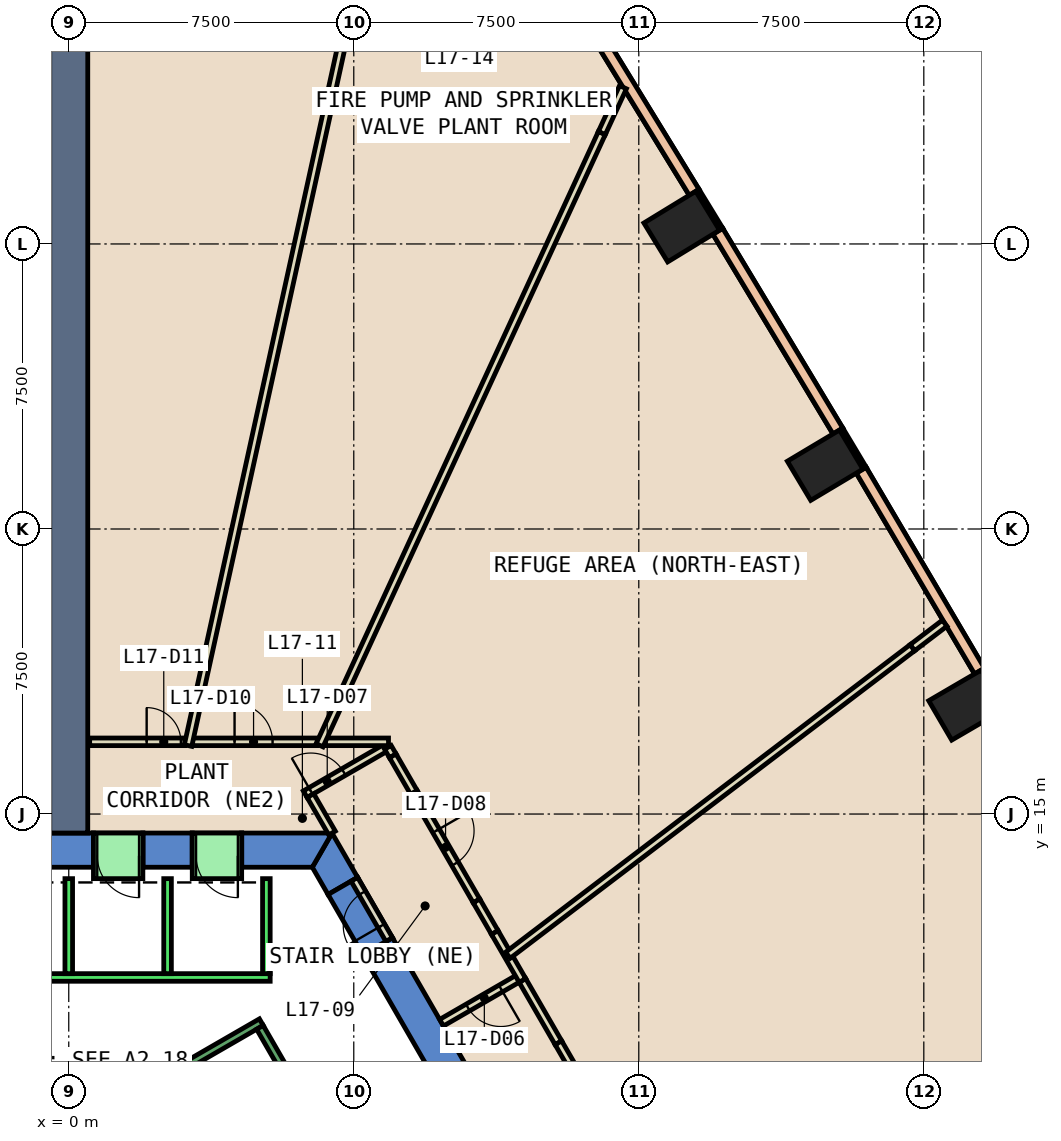
"""IFC4 building model, lengths in metres.
Left out: names, types, materials, properties, quantities, classifications, styles, units other than length and angle.
Written with IfcOpenShell. Run it as: python <this file> out.ifc"""

import sys

from ifc_helpers import new_model, si_unit, direction, frame, frame_2d, origin, origin_2d, place, context, subcontext, project, spatial, polyline, rectangle, outline, extrude, element, fill, save


model = new_model("IFC4")
c1 = context("Model", 3, precision=1e-05, world=origin(), true_north=direction((0.0, 1.0)))
c2 = subcontext(c1, "Body", "Model", "MODEL_VIEW")
j1 = project(units=[si_unit("LENGTHUNIT", "METRE"), si_unit("PLANEANGLEUNIT", "RADIAN")], contexts=[c1])
p1 = place(None, origin())
s1 = spatial("IfcSite", under=j1, at=p1, CompositionType="ELEMENT")
p2 = place(p1, origin())
s2 = spatial("IfcBuilding", under=s1, at=p2, CompositionType="ELEMENT")
p3 = place(p2, frame((0.0, 0.0, 81.2)))
s3 = spatial("IfcBuildingStorey", under=s2, at=p3, CompositionType="ELEMENT", Elevation=81.2)
for number, where, z_axis, x_axis in (
    (1, (23.623, 17.867, -0.6), (0.0, 0.0, 1.0), (-0.504, 0.864, 0.0)),
    (2, (19.904, 24.179, -0.6), (0.0, 0.0, 1.0), (-0.513, 0.858, 0.0)),
    (3, (16.13, 30.457, -0.6), (0.0, 0.0, 1.0), (-0.522, 0.853, 0.0)),
):
    element("IfcColumn", number, at=place(p3, frame(where, z_axis=z_axis, x_axis=x_axis)), inside=s3, PredefinedType="COLUMN", context=c2, shape_type="SweptSolid", body=[
        extrude(rectangle(XDim=1.2, YDim=1.6, at=origin_2d()), origin(), (0.0, 0.0, 1.0), 5.4),
    ])
p4 = place(p3, frame((0.0, 0.0, -0.6)))
e4 = element("IfcWall", 4, at=p4, inside=s3, PredefinedType="SHEAR", context=c2, shape_type="SweptSolid", body=[
    extrude(outline(polyline([(8.517, 11.747), (7.738, 11.298), (12.817, 2.5), (13.856, 2.5), (8.517, 11.747)])), origin(), (0.0, 0.0, 1.0), 5.4),
])
p5 = place(p3, frame((0.0, 0.0, -0.6)))
e5 = element("IfcWall", 5, at=p5, inside=s3, PredefinedType="SHEAR", context=c2, shape_type="SweptSolid", body=[
    extrude(outline(polyline([(6.823, 12.882), (7.602, 13.332), (6.928, 14.5), (6.409, 13.6), (6.823, 12.882)])), origin(), (0.0, 0.0, 1.0), 5.4),
])
p6 = place(p3, frame((0.0, 0.0, 3.6)))
e6 = element("IfcWall", 6, at=p6, inside=s3, PredefinedType="SHEAR", context=c2, shape_type="SweptSolid", body=[
    extrude(outline(polyline([(7.602, 13.332), (6.823, 12.882), (7.738, 11.298), (8.517, 11.747), (7.602, 13.332)])), origin(), (0.0, 0.0, 1.0), 1.2),
])
p7 = place(p3, frame((0.0, 0.0, -0.6)))
e7 = element("IfcWall", 7, at=p7, inside=s3, PredefinedType="SHEAR", context=c2, shape_type="SweptSolid", body=[
    extrude(outline(polyline([(4.55, 14.5), (4.55, 13.6), (6.409, 13.6), (6.928, 14.5), (4.55, 14.5)])), origin(), (0.0, 0.0, 1.0), 5.4),
])
p8 = place(p3, frame((0.0, 0.0, -0.6)))
e8 = element("IfcWall", 8, at=p8, inside=s3, PredefinedType="SHEAR", context=c2, shape_type="SweptSolid", body=[
    extrude(outline(polyline([(1.95, 14.5), (1.95, 13.6), (3.25, 13.6), (3.25, 14.5), (1.95, 14.5)])), origin(), (0.0, 0.0, 1.0), 5.4),
])
p9 = place(p3, frame((0.0, 0.0, -0.6)))
e9 = element("IfcWall", 9, at=p9, inside=s3, PredefinedType="SHEAR", context=c2, shape_type="SweptSolid", body=[
    extrude(outline(polyline([(-0.65, 14.5), (-0.65, 13.6), (0.65, 13.6), (0.65, 14.5), (-0.65, 14.5)])), origin(), (0.0, 0.0, 1.0), 5.4),
])
p10 = place(p3, frame((0.0, 0.0, 3.6)))
e10 = element("IfcWall", 10, at=p10, inside=s3, PredefinedType="SHEAR", context=c2, shape_type="SweptSolid", body=[
    extrude(outline(polyline([(3.25, 14.5), (3.25, 13.6), (4.55, 13.6), (4.55, 14.5), (3.25, 14.5)])), origin(), (0.0, 0.0, 1.0), 1.2),
])
p11 = place(p3, frame((0.0, 0.0, 3.6)))
e11 = element("IfcWall", 11, at=p11, inside=s3, PredefinedType="SHEAR", context=c2, shape_type="SweptSolid", body=[
    extrude(outline(polyline([(0.65, 14.5), (0.65, 13.6), (1.95, 13.6), (1.95, 14.5), (0.65, 14.5)])), origin(), (0.0, 0.0, 1.0), 1.2),
])
p12 = place(p3, frame((0.0, 14.5, 0.0), z_axis=(0.0, 0.0, 1.0), x_axis=(0.0, 1.0, 0.0)))
e12 = element("IfcWall", 12, at=p12, inside=s3, PredefinedType="SHEAR", context=c2, shape_type="SweptSolid", body=[
    extrude(rectangle(XDim=32.052, YDim=1.0, at=frame_2d((16.026, 0.0))), origin(), (0.0, 0.0, 1.0), 4.8),
])
p13 = place(p3, frame((20.942, 24.1, 0.0), z_axis=(0.0, 0.0, 1.0), x_axis=(-0.513328378832, 0.858192271863, 0.0)))
e13 = element("IfcWall", 13, at=p13, inside=s3, PredefinedType="STANDARD", context=c2, shape_type="SweptSolid", body=[
    extrude(rectangle(XDim=1.2, YDim=0.1, at=frame_2d((0.6, 0.0))), origin(), (0.0, 0.0, 1.0), 4.8),
])
p14 = place(p3, frame((17.168, 30.388, 0.0), z_axis=(0.0, 0.0, 1.0), x_axis=(-0.521507599072, 0.853246637327, 0.0)))
e14 = element("IfcWall", 14, at=p14, inside=s3, PredefinedType="STANDARD", context=c2, shape_type="SweptSolid", body=[
    extrude(rectangle(XDim=1.2, YDim=0.1, at=frame_2d((0.6, 0.0))), origin(), (0.0, 0.0, 1.0), 4.8),
])
p15 = place(p3, frame((23.966, 18.761, 0.0), z_axis=(0.0, 0.0, 1.0), x_axis=(-0.507498222671, 0.86165280362, 0.0)))
e15 = element("IfcWall", 15, at=p15, inside=s3, PredefinedType="STANDARD", context=c2, shape_type="SweptSolid", body=[
    extrude(rectangle(XDim=6.136, YDim=0.3, at=frame_2d((3.068, 0.0))), origin(), (0.0, 0.0, 1.0), 1.2),
])
p16 = place(p3, frame((23.966, 18.761, 4.0), z_axis=(0.0, 0.0, 1.0), x_axis=(-0.507498222671, 0.86165280362, 0.0)))
e16 = element("IfcWall", 16, at=p16, inside=s3, PredefinedType="STANDARD", context=c2, shape_type="SweptSolid", body=[
    extrude(rectangle(XDim=6.136, YDim=0.3, at=frame_2d((3.068, 0.0))), origin(), (0.0, 0.0, 1.0), 0.8),
])
p17 = place(p3, frame((20.24, 25.077, 0.0), z_axis=(0.0, 0.0, 1.0), x_axis=(-0.515291535196, 0.857014955386, 0.0)))
e17 = element("IfcWall", 17, at=p17, inside=s3, PredefinedType="STANDARD", context=c2, shape_type="SweptSolid", body=[
    extrude(rectangle(XDim=6.134, YDim=0.3, at=frame_2d((3.067, 0.0))), origin(), (0.0, 0.0, 1.0), 1.2),
])
p18 = place(p3, frame((20.24, 25.077, 4.0), z_axis=(0.0, 0.0, 1.0), x_axis=(-0.515291535196, 0.857014955386, 0.0)))
e18 = element("IfcWall", 18, at=p18, inside=s3, PredefinedType="STANDARD", context=c2, shape_type="SweptSolid", body=[
    extrude(rectangle(XDim=6.134, YDim=0.3, at=frame_2d((3.067, 0.0))), origin(), (0.0, 0.0, 1.0), 0.8),
])
p19 = place(p3, frame((16.457, 31.358, 0.0), z_axis=(0.0, 0.0, 1.0), x_axis=(-0.522658154315, 0.852542347176, 0.0)))
e19 = element("IfcWall", 19, at=p19, inside=s3, PredefinedType="STANDARD", context=c2, shape_type="SweptSolid", body=[
    extrude(rectangle(XDim=6.136, YDim=0.3, at=frame_2d((3.068, 0.0))), origin(), (0.0, 0.0, 1.0), 1.2),
])
p20 = place(p3, frame((16.457, 31.358, 4.0), z_axis=(0.0, 0.0, 1.0), x_axis=(-0.522658154315, 0.852542347176, 0.0)))
e20 = element("IfcWall", 20, at=p20, inside=s3, PredefinedType="STANDARD", context=c2, shape_type="SweptSolid", body=[
    extrude(rectangle(XDim=6.136, YDim=0.3, at=frame_2d((3.068, 0.0))), origin(), (0.0, 0.0, 1.0), 0.8),
])
p21 = place(p3, frame((11.888, 10.709, 0.0), z_axis=(0.0, 0.0, 1.0), x_axis=(-0.865973769406, -0.500089422704, 0.0)))
e21 = element("IfcWall", 21, at=p21, inside=s3, PredefinedType="PARTITIONING", context=c2, shape_type="SweptSolid", body=[
    extrude(rectangle(XDim=2.399, YDim=0.2, at=frame_2d((1.2, 0.0))), origin(), (0.0, 0.0, 1.0), 4.8),
])
p22 = place(p21, frame((0.6, 0.0, 0.0)))
e22 = element("IfcOpeningElement", 22, at=p22, cuts=e21, PredefinedType="OPENING", context=c2, shape_type="SweptSolid", body=[
    extrude(rectangle(XDim=1.0, YDim=2.1, at=frame_2d((0.5, 1.05))), frame((0.0, 0.11, 0.0), z_axis=(0.0, -1.0, 0.0), x_axis=(1.0, 0.0, 0.0)), (0.0, 0.0, 1.0), 0.22),
])
p23 = place(p3, frame((6.223, 15.521, 0.0), z_axis=(0.0, 0.0, 1.0), x_axis=(0.866022959057, 0.500004234368, 0.0)))
e23 = element("IfcWall", 23, at=p23, inside=s3, PredefinedType="PARTITIONING", context=c2, shape_type="SweptSolid", body=[
    extrude(rectangle(XDim=2.5, YDim=0.2, at=frame_2d((1.25, 0.0))), origin(), (0.0, 0.0, 1.0), 4.8),
])
p24 = place(p23, frame((0.168, 0.0, 0.0)))
e24 = element("IfcOpeningElement", 24, at=p24, cuts=e23, PredefinedType="OPENING", context=c2, shape_type="SweptSolid", body=[
    extrude(rectangle(XDim=1.0, YDim=2.1, at=frame_2d((0.5, 1.05))), frame((0.0, 0.11, 0.0), z_axis=(0.0, -1.0, 0.0), x_axis=(1.0, 0.0, 0.0)), (0.0, 0.0, 1.0), 0.22),
])
p25 = place(p3, frame((6.36, 15.484, 0.0), z_axis=(0.0, 0.0, 1.0), x_axis=(0.499883687939, -0.866092546171, 0.0)))
e25 = element("IfcWall", 25, at=p25, inside=s3, PredefinedType="PARTITIONING", context=c2, shape_type="SweptSolid", body=[
    extrude(rectangle(XDim=1.136, YDim=0.2, at=frame_2d((0.568, 0.0))), origin(), (0.0, 0.0, 1.0), 4.8),
])
p26 = place(p3, frame((8.398, 16.754, 0.0), z_axis=(0.0, 0.0, 1.0), x_axis=(0.499695194987, -0.866201311536, 0.0)))
e26 = element("IfcWall", 26, at=p26, inside=s3, PredefinedType="PARTITIONING", context=c2, shape_type="SweptSolid", body=[
    extrude(rectangle(XDim=0.259, YDim=0.2, at=frame_2d((0.129, 0.0))), origin(), (0.0, 0.0, 1.0), 4.8),
])
p27 = place(p3, frame((11.938, 10.622, 0.0), z_axis=(0.0, 0.0, 1.0), x_axis=(0.499811688139, -0.866134098394, 0.0)))
e27 = element("IfcWall", 27, at=p27, inside=s3, PredefinedType="PARTITIONING", context=c2, shape_type="SweptSolid", body=[
    extrude(rectangle(XDim=1.895, YDim=0.2, at=frame_2d((0.947, 0.0))), origin(), (0.0, 0.0, 1.0), 4.8),
])
p28 = place(p3, frame((6.741, 16.9, 0.0), z_axis=(0.0, 0.0, 1.0), x_axis=(1.0, 0.0, 0.0)))
e28 = element("IfcWall", 28, at=p28, inside=s3, PredefinedType="PARTITIONING", context=c2, shape_type="SweptSolid", body=[
    extrude(rectangle(XDim=1.673, YDim=0.2, at=frame_2d((0.836, 0.0))), origin(), (0.0, 0.0, 1.0), 4.8),
])
p29 = place(p3, frame((3.26, 16.9, 0.0), z_axis=(0.0, 0.0, 1.0), x_axis=(1.0, 0.0, 0.0)))
e29 = element("IfcWall", 29, at=p29, inside=s3, PredefinedType="PARTITIONING", context=c2, shape_type="SweptSolid", body=[
    extrude(rectangle(XDim=3.281, YDim=0.2, at=frame_2d((1.641, 0.0))), origin(), (0.0, 0.0, 1.0), 4.8),
])
p30 = place(p29, frame((1.103, 0.0, 0.0)))
e30 = element("IfcOpeningElement", 30, at=p30, cuts=e29, PredefinedType="OPENING", context=c2, shape_type="SweptSolid", body=[
    extrude(rectangle(XDim=1.0, YDim=2.1, at=frame_2d((0.5, 1.05))), frame((0.0, 0.11, 0.0), z_axis=(0.0, -1.0, 0.0), x_axis=(1.0, 0.0, 0.0)), (0.0, 0.0, 1.0), 0.22),
])
p31 = place(p3, frame((0.55, 16.9, 0.0), z_axis=(0.0, 0.0, 1.0), x_axis=(1.0, 0.0, 0.0)))
e31 = element("IfcWall", 31, at=p31, inside=s3, PredefinedType="PARTITIONING", context=c2, shape_type="SweptSolid", body=[
    extrude(rectangle(XDim=2.51, YDim=0.2, at=frame_2d((1.255, 0.0))), origin(), (0.0, 0.0, 1.0), 4.8),
])
p32 = place(p31, frame((1.5, 0.0, 0.0)))
e32 = element("IfcOpeningElement", 32, at=p32, cuts=e31, PredefinedType="OPENING", context=c2, shape_type="SweptSolid", body=[
    extrude(rectangle(XDim=0.9, YDim=2.1, at=frame_2d((0.45, 1.05))), frame((0.0, 0.11, 0.0), z_axis=(0.0, -1.0, 0.0), x_axis=(1.0, 0.0, 0.0)), (0.0, 0.0, 1.0), 0.22),
])
p33 = place(p3, frame((23.049, 20.022, 0.0), z_axis=(0.0, 0.0, 1.0), x_axis=(-0.796091779044, -0.605175907764, 0.0)))
e33 = element("IfcWall", 33, at=p33, inside=s3, PredefinedType="PARTITIONING", context=c2, shape_type="SweptSolid", body=[
    extrude(rectangle(XDim=1.069, YDim=0.2, at=frame_2d((0.535, 0.0))), origin(), (0.0, 0.0, 1.0), 2.4),
])
p34 = place(p3, frame((6.599, 16.809, 0.0), z_axis=(0.0, 0.0, 1.0), x_axis=(0.418762306906, 0.908095881675, 0.0)))
e34 = element("IfcWall", 34, at=p34, inside=s3, PredefinedType="PARTITIONING", context=c2, shape_type="SweptSolid", body=[
    extrude(rectangle(XDim=17.74, YDim=0.2, at=frame_2d((8.87, 0.0))), origin(), (0.0, 0.0, 1.0), 4.8),
])
p35 = place(p3, frame((3.139, 16.802, 0.0), z_axis=(0.0, 0.0, 1.0), x_axis=(0.214360085787, 0.97675470494, 0.0)))
e35 = element("IfcWall", 35, at=p35, inside=s3, PredefinedType="PARTITIONING", context=c2, shape_type="SweptSolid", body=[
    extrude(rectangle(XDim=25.271, YDim=0.2, at=frame_2d((12.635, 0.0))), origin(), (0.0, 0.0, 1.0), 2.3),
])
p36 = place(p3, frame((8.431, 11.698, 0.0), z_axis=(0.0, 0.0, 1.0), x_axis=(-0.500115259676, 0.865958848352, 0.0)))
e36 = element("IfcWall", 36, at=p36, inside=s3, PredefinedType="PARTITIONING", context=c2, shape_type="SweptSolid", body=[
    extrude(rectangle(XDim=1.829, YDim=0.2, at=frame_2d((0.915, 0.0))), origin(), (0.0, 0.0, 1.0), 2.4),
])
p37 = place(p36, frame((0.415, 0.0, 0.0)))
e37 = element("IfcOpeningElement", 37, at=p37, cuts=e36, PredefinedType="OPENING", context=c2, shape_type="SweptSolid", body=[
    extrude(rectangle(XDim=1.0, YDim=2.1, at=frame_2d((0.5, 1.05))), frame((0.0, 0.11, 0.0), z_axis=(0.0, -1.0, 0.0), x_axis=(1.0, 0.0, 0.0)), (0.0, 0.0, 1.0), 0.22),
])
p38 = place(p3, frame((8.527, 16.53, 0.0), z_axis=(0.0, 0.0, 1.0), x_axis=(0.499893495202, -0.866086885627, 0.0)))
e38 = element("IfcWall", 38, at=p38, inside=s3, PredefinedType="PARTITIONING", context=c2, shape_type="SweptSolid", body=[
    extrude(rectangle(XDim=1.112, YDim=0.2, at=frame_2d((0.556, 0.0))), origin(), (0.0, 0.0, 1.0), 2.4),
])
p39 = place(p3, frame((9.083, 15.567, 0.0), z_axis=(0.0, 0.0, 1.0), x_axis=(0.499981217486, -0.866036247602, 0.0)))
e39 = element("IfcWall", 39, at=p39, inside=s3, PredefinedType="PARTITIONING", context=c2, shape_type="SweptSolid", body=[
    extrude(rectangle(XDim=3.294, YDim=0.2, at=frame_2d((1.647, 0.0))), origin(), (0.0, 0.0, 1.0), 4.8),
])
p40 = place(p39, frame((1.165, 0.0, 0.0)))
e40 = element("IfcOpeningElement", 40, at=p40, cuts=e39, PredefinedType="OPENING", context=c2, shape_type="SweptSolid", body=[
    extrude(rectangle(XDim=1.0, YDim=2.1, at=frame_2d((0.5, 1.05))), frame((0.0, 0.11, 0.0), z_axis=(0.0, -1.0, 0.0), x_axis=(1.0, 0.0, 0.0)), (0.0, 0.0, 1.0), 0.22),
])
p41 = place(p3, frame((10.73, 12.714, 0.0), z_axis=(0.0, 0.0, 1.0), x_axis=(0.500455348268, -0.865762348679, 0.0)))
e41 = element("IfcWall", 41, at=p41, inside=s3, PredefinedType="PARTITIONING", context=c2, shape_type="SweptSolid", body=[
    extrude(rectangle(XDim=0.961, YDim=0.2, at=frame_2d((0.48, 0.0))), origin(), (0.0, 0.0, 1.0), 2.4),
])
p42 = place(p3, frame((11.211, 11.882, 0.0), z_axis=(0.0, 0.0, 1.0), x_axis=(0.49978541015, -0.866149261849, 0.0)))
e42 = element("IfcWall", 42, at=p42, inside=s3, PredefinedType="PARTITIONING", context=c2, shape_type="SweptSolid", body=[
    extrude(rectangle(XDim=1.455, YDim=0.2, at=frame_2d((0.728, 0.0))), origin(), (0.0, 0.0, 1.0), 4.8),
])
p43 = place(p3, frame((12.885, 8.981, 0.0), z_axis=(0.0, 0.0, 1.0), x_axis=(0.500242282693, -0.865885476611, 0.0)))
e43 = element("IfcWall", 43, at=p43, inside=s3, PredefinedType="PARTITIONING", context=c2, shape_type="SweptSolid", body=[
    extrude(rectangle(XDim=0.921, YDim=0.2, at=frame_2d((0.461, 0.0))), origin(), (0.0, 0.0, 1.0), 2.4),
])
p44 = place(p3, frame((22.198, 19.375, 0.0), z_axis=(0.0, 0.0, 1.0), x_axis=(-0.796086524029, -0.605182820526, 0.0)))
e44 = element("IfcWall", 44, at=p44, inside=s3, PredefinedType="PARTITIONING", context=c2, shape_type="SweptSolid", body=[
    extrude(rectangle(XDim=13.368, YDim=0.2, at=frame_2d((6.684, 0.0))), origin(), (0.0, 0.0, 1.0), 4.8),
])
p45 = place(p3, frame((14.028, 32.919, 0.0), z_axis=(0.0, 0.0, 1.0), x_axis=(0.418603457455, 0.908169117184, 0.0)))
e45 = element("IfcWall", 45, at=p45, inside=s3, PredefinedType="PARTITIONING", context=c2, shape_type="SweptSolid", body=[
    extrude(rectangle(XDim=1.328, YDim=0.2, at=frame_2d((0.664, 0.0))), origin(), (0.0, 0.0, 1.0), 2.4),
])
p46 = place(p3, frame((5.3, 10.7, 0.0), z_axis=(0.0, 0.0, 1.0), x_axis=(-1.0, 0.0, 0.0)))
e46 = element("IfcWall", 46, at=p46, inside=s3, PredefinedType="STANDARD", context=c2, shape_type="SweptSolid", body=[
    extrude(rectangle(XDim=10.6, YDim=0.2, at=frame_2d((5.3, 0.0))), origin(), (0.0, 0.0, 1.0), 4.8),
])
for number, where, z_axis, x_axis in (
    (47, (5.2, 10.8, 0.0), (0.0, 0.0, 1.0), (0.0, 1.0, 0.0)),
    (48, (2.6, 10.8, 0.0), (0.0, 0.0, 1.0), (0.0, 1.0, 0.0)),
    (49, (0.0, 10.8, 0.0), (0.0, 0.0, 1.0), (0.0, 1.0, 0.0)),
):
    element("IfcWall", number, at=place(p3, frame(where, z_axis=z_axis, x_axis=x_axis)), inside=s3, PredefinedType="STANDARD", context=c2, shape_type="SweptSolid", body=[
        extrude(rectangle(XDim=2.5, YDim=0.2, at=frame_2d((1.25, 0.0))), origin(), (0.0, 0.0, 1.0), 4.8),
    ])
p47 = place(p3, frame((4.55, 13.9, 0.0), z_axis=(0.0, 0.0, 1.0), x_axis=(-1.0, 0.0, 0.0)))
e50 = element("IfcWall", 50, at=p47, inside=s3, PredefinedType="STANDARD", context=c2, shape_type="SweptSolid", body=[
    extrude(rectangle(XDim=1.3, YDim=1.2, at=frame_2d((0.65, 0.0))), origin(), (0.0, 0.0, 1.0), 2.4),
])
p48 = place(p47, frame((0.1, 0.0, 0.0)))
e51 = element("IfcOpeningElement", 51, at=p48, cuts=e50, PredefinedType="OPENING", context=c2, shape_type="SweptSolid", body=[
    extrude(rectangle(XDim=1.1, YDim=2.3, at=frame_2d((0.55, 1.15))), frame((0.0, 0.61, 0.0), z_axis=(0.0, -1.0, 0.0), x_axis=(1.0, 0.0, 0.0)), (0.0, 0.0, 1.0), 1.22),
])
p49 = place(p3, frame((1.95, 13.9, 0.0), z_axis=(0.0, 0.0, 1.0), x_axis=(-1.0, 0.0, 0.0)))
e52 = element("IfcWall", 52, at=p49, inside=s3, PredefinedType="STANDARD", context=c2, shape_type="SweptSolid", body=[
    extrude(rectangle(XDim=1.3, YDim=1.2, at=frame_2d((0.65, 0.0))), origin(), (0.0, 0.0, 1.0), 2.4),
])
p50 = place(p49, frame((0.1, 0.0, 0.0)))
e53 = element("IfcOpeningElement", 53, at=p50, cuts=e52, PredefinedType="OPENING", context=c2, shape_type="SweptSolid", body=[
    extrude(rectangle(XDim=1.1, YDim=2.3, at=frame_2d((0.55, 1.15))), frame((0.0, 0.61, 0.0), z_axis=(0.0, -1.0, 0.0), x_axis=(1.0, 0.0, 0.0)), (0.0, 0.0, 1.0), 1.22),
])
p51 = place(p3, frame((1.256, 7.324, 0.0), z_axis=(0.0, 0.0, 1.0), x_axis=(0.866046073146, 0.499964197906, 0.0)))
e54 = element("IfcWall", 54, at=p51, inside=s3, PredefinedType="STANDARD", context=c2, shape_type="SweptSolid", body=[
    extrude(rectangle(XDim=4.4, YDim=0.2, at=frame_2d((2.2, 0.0))), origin(), (0.0, 0.0, 1.0), 4.8),
])
p52 = place(p3, frame((8.48, 3.412, 0.0), z_axis=(0.0, 0.0, 1.0), x_axis=(-0.499978703459, 0.866037698999, 0.0)))
e55 = element("IfcWall", 55, at=p52, inside=s3, PredefinedType="STANDARD", context=c2, shape_type="SweptSolid", body=[
    extrude(rectangle(XDim=6.9, YDim=0.2, at=frame_2d((3.45, 0.0))), origin(), (0.0, 0.0, 1.0), 4.8),
])
p53 = place(p22, origin())
e56 = element("IfcDoor", 56, at=p53, inside=s3, OperationType="SINGLE_SWING_RIGHT", PredefinedType="DOOR", context=c2, shape_type="SweptSolid", body=[
    extrude(rectangle(XDim=1.0, YDim=2.1, at=frame_2d((0.5, 1.05))), frame((0.0, 0.025, 0.0), z_axis=(0.0, -1.0, 0.0), x_axis=(1.0, 0.0, 0.0)), (0.0, 0.0, 1.0), 0.05),
])
fill(e22, e56)
p54 = place(p24, origin())
e57 = element("IfcDoor", 57, at=p54, inside=s3, OperationType="SINGLE_SWING_LEFT", PredefinedType="DOOR", context=c2, shape_type="SweptSolid", body=[
    extrude(rectangle(XDim=1.0, YDim=2.1, at=frame_2d((0.5, 1.05))), frame((0.0, 0.025, 0.0), z_axis=(0.0, -1.0, 0.0), x_axis=(1.0, 0.0, 0.0)), (0.0, 0.0, 1.0), 0.05),
])
fill(e24, e57)
p55 = place(p40, origin())
e58 = element("IfcDoor", 58, at=p55, inside=s3, OperationType="SINGLE_SWING_RIGHT", PredefinedType="DOOR", context=c2, shape_type="SweptSolid", body=[
    extrude(rectangle(XDim=1.0, YDim=2.1, at=frame_2d((0.5, 1.05))), frame((0.0, 0.025, 0.0), z_axis=(0.0, -1.0, 0.0), x_axis=(1.0, 0.0, 0.0)), (0.0, 0.0, 1.0), 0.05),
])
fill(e40, e58)
p56 = place(p30, origin())
e59 = element("IfcDoor", 59, at=p56, inside=s3, OperationType="SINGLE_SWING_RIGHT", PredefinedType="DOOR", context=c2, shape_type="SweptSolid", body=[
    extrude(rectangle(XDim=1.0, YDim=2.1, at=frame_2d((0.5, 1.05))), frame((0.0, 0.025, 0.0), z_axis=(0.0, -1.0, 0.0), x_axis=(1.0, 0.0, 0.0)), (0.0, 0.0, 1.0), 0.05),
])
fill(e30, e59)
p57 = place(p32, origin())
e60 = element("IfcDoor", 60, at=p57, inside=s3, OperationType="SINGLE_SWING_LEFT", PredefinedType="DOOR", context=c2, shape_type="SweptSolid", body=[
    extrude(rectangle(XDim=0.9, YDim=2.1, at=frame_2d((0.45, 1.05))), frame((0.0, 0.025, 0.0), z_axis=(0.0, -1.0, 0.0), x_axis=(1.0, 0.0, 0.0)), (0.0, 0.0, 1.0), 0.05),
])
fill(e32, e60)
p58 = place(p37, origin())
e61 = element("IfcDoor", 61, at=p58, inside=s3, OperationType="SINGLE_SWING_LEFT", PredefinedType="DOOR", context=c2, shape_type="SweptSolid", body=[
    extrude(rectangle(XDim=1.0, YDim=2.1, at=frame_2d((0.5, 1.05))), frame((0.0, 0.025, 0.0), z_axis=(0.0, -1.0, 0.0), x_axis=(1.0, 0.0, 0.0)), (0.0, 0.0, 1.0), 0.05),
])
fill(e37, e61)
p59 = place(p48, origin())
e62 = element("IfcDoor", 62, at=p59, inside=s3, OperationType="SLIDING_TO_LEFT", PredefinedType="DOOR", context=c2, shape_type="SweptSolid", body=[
    extrude(rectangle(XDim=1.1, YDim=2.3, at=frame_2d((0.55, 1.15))), frame((0.0, 0.025, 0.0), z_axis=(0.0, -1.0, 0.0), x_axis=(1.0, 0.0, 0.0)), (0.0, 0.0, 1.0), 0.05),
])
fill(e51, e62)
p60 = place(p50, origin())
e63 = element("IfcDoor", 63, at=p60, inside=s3, OperationType="SLIDING_TO_LEFT", PredefinedType="DOOR", context=c2, shape_type="SweptSolid", body=[
    extrude(rectangle(XDim=1.1, YDim=2.3, at=frame_2d((0.55, 1.15))), frame((0.0, 0.025, 0.0), z_axis=(0.0, -1.0, 0.0), x_axis=(1.0, 0.0, 0.0)), (0.0, 0.0, 1.0), 0.05),
])
fill(e53, e63)
save(model, sys.argv[1])
